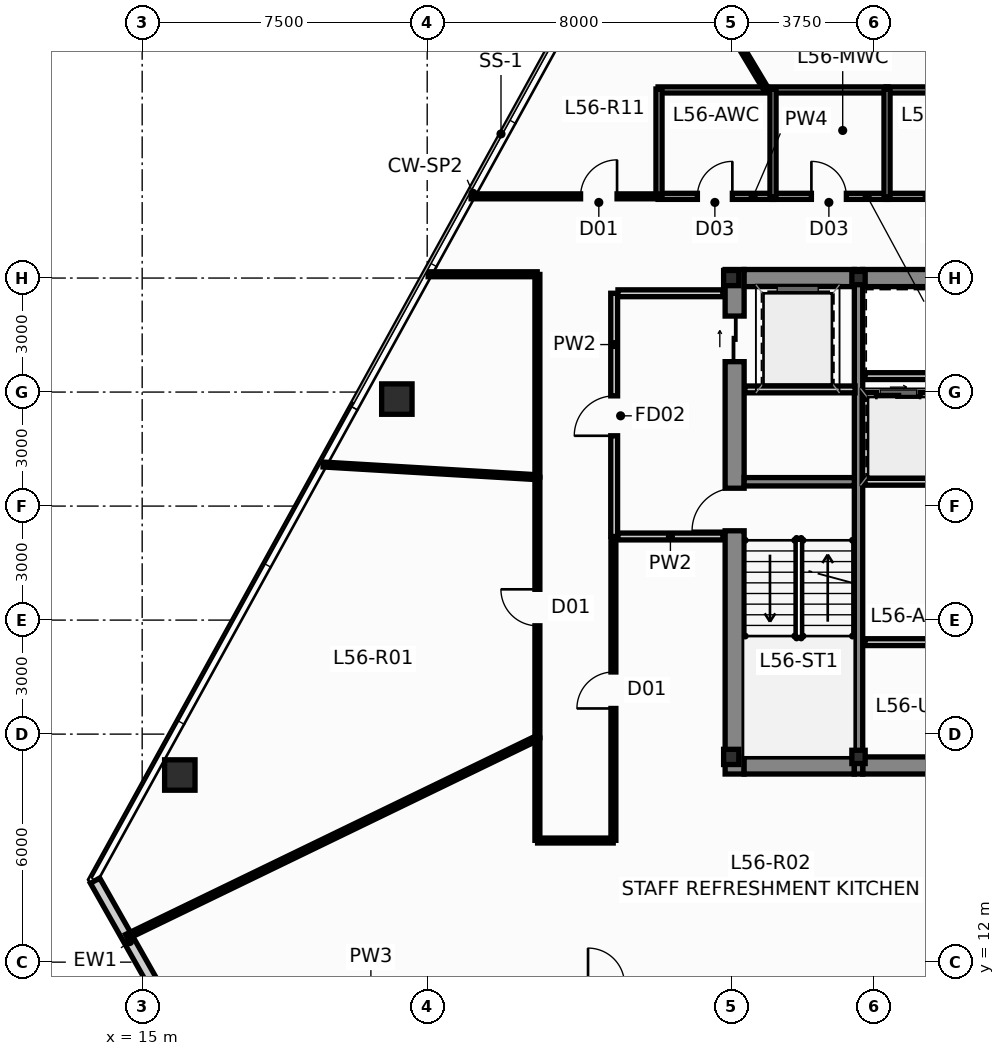
"""IFC4 building model, lengths in metres.
Left out: names, types, materials, properties, quantities, classifications, styles, units other than length and angle.
Written with IfcOpenShell. Run it as: python <this file> out.ifc"""

import sys

from ifc_helpers import new_model, si_unit, direction, frame, frame_2d, origin, origin_2d, place, context, subcontext, project, spatial, rectangle, hollow_rectangle, i_section, extrude, source, transform, mapped, element, fill, save


model = new_model("IFC4")
c1 = context("Model", 3, precision=1e-05, world=origin(), true_north=direction((0.0, 1.0)))
c2 = subcontext(c1, "Body", "Model", "MODEL_VIEW")
j1 = project(units=[si_unit("LENGTHUNIT", "METRE"), si_unit("PLANEANGLEUNIT", "RADIAN")], contexts=[c1])
p1 = place(None, origin())
s1 = spatial("IfcSite", under=j1, at=p1, CompositionType="ELEMENT")
p2 = place(p1, origin())
s2 = spatial("IfcBuilding", under=s1, at=p2, CompositionType="ELEMENT")
p3 = place(p2, frame((0.0, 0.0, 213.25)))
s3 = spatial("IfcBuildingStorey", under=s2, at=p3, CompositionType="ELEMENT", Elevation=213.25)
m1 = source(origin(), c2, "Body", "SweptSolid", [
    extrude(i_section(OverallWidth=0.4, OverallDepth=0.4, WebThickness=0.02, FlangeThickness=0.032, at=origin_2d()), origin(), (0.0, 0.0, 1.0), 3.65),
])
for number, where, z_axis, x_axis in (
    (1, (30.5, 17.4, 0.0), (0.0, 0.0, 1.0), (1.0, 0.0, 0.0)),
    (2, (30.5, 30.0, 0.0), (0.0, 0.0, 1.0), (1.0, 0.0, 0.0)),
):
    element("IfcColumn", number, at=place(p3, frame(where, z_axis=z_axis, x_axis=x_axis)), inside=s3, PredefinedType="COLUMN", context=c2, shape_type="MappedRepresentation", body=[
        mapped(m1, transform((0.0, 0.0, 0.0), scale=1.0)),
    ])
m2 = source(origin(), c2, "Body", "SweptSolid", [
    extrude(hollow_rectangle(XDim=0.35, YDim=0.35, WallThickness=0.016, at=origin_2d()), origin(), (0.0, 0.0, 1.0), 3.65),
])
for number, where, z_axis, x_axis in (
    (3, (33.85, 17.4, 0.0), (0.0, 0.0, 1.0), (1.0, 0.0, 0.0)),
    (4, (33.85, 30.0, 0.0), (0.0, 0.0, 1.0), (1.0, 0.0, 0.0)),
):
    element("IfcColumn", number, at=place(p3, frame(where, z_axis=z_axis, x_axis=x_axis)), inside=s3, PredefinedType="COLUMN", context=c2, shape_type="MappedRepresentation", body=[
        mapped(m2, transform((0.0, 0.0, 0.0), scale=1.0)),
    ])
p4 = place(p3, frame((30.59, 16.95, 0.0), z_axis=(0.0, 0.0, 1.0), x_axis=(0.0, 1.0, 0.0)))
e5 = element("IfcWall", 5, at=p4, inside=s3, PredefinedType="SHEAR", context=c2, shape_type="SweptSolid", body=[
    extrude(rectangle(XDim=13.275, YDim=0.5, at=frame_2d((6.638, 0.0))), origin(), (0.0, 0.0, 1.0), 3.65),
])
p5 = place(p4, frame((6.4, 0.0, 0.0)))
e6 = element("IfcOpeningElement", 6, at=p5, cuts=e5, PredefinedType="OPENING", context=c2, shape_type="SweptSolid", body=[
    extrude(rectangle(XDim=1.12, YDim=2.15, at=frame_2d((0.56, 1.075))), frame((0.0, 0.262, 0.0), z_axis=(0.0, -1.0, 0.0), x_axis=(1.0, 0.0, 0.0)), (0.0, 0.0, 1.0), 0.524),
])
p6 = place(p4, frame((10.85, 0.0, 0.0)))
e7 = element("IfcOpeningElement", 7, at=p6, cuts=e5, PredefinedType="OPENING", context=c2, shape_type="SweptSolid", body=[
    extrude(rectangle(XDim=1.2, YDim=2.2, at=frame_2d((0.6, 1.1))), frame((0.0, 0.262, 0.0), z_axis=(0.0, -1.0, 0.0), x_axis=(1.0, 0.0, 0.0)), (0.0, 0.0, 1.0), 0.524),
])
p7 = place(p3, frame((30.84, 17.175, 0.0), z_axis=(0.0, 0.0, 1.0), x_axis=(1.0, 0.0, 0.0)))
e8 = element("IfcWall", 8, at=p7, inside=s3, PredefinedType="SHEAR", context=c2, shape_type="SweptSolid", body=[
    extrude(rectangle(XDim=2.9, YDim=0.45, at=frame_2d((1.45, 0.0))), origin(), (0.0, 0.0, 1.0), 3.65),
])
p8 = place(p3, frame((33.96, 17.175, 0.0), z_axis=(0.0, 0.0, 1.0), x_axis=(1.0, 0.0, 0.0)))
e9 = element("IfcWall", 9, at=p8, inside=s3, PredefinedType="SHEAR", context=c2, shape_type="SweptSolid", body=[
    extrude(rectangle(XDim=8.08, YDim=0.45, at=frame_2d((4.04, 0.0))), origin(), (0.0, 0.0, 1.0), 3.65),
])
p9 = place(p3, frame((30.84, 30.0, 0.0), z_axis=(0.0, 0.0, 1.0), x_axis=(1.0, 0.0, 0.0)))
e10 = element("IfcWall", 10, at=p9, inside=s3, PredefinedType="SHEAR", context=c2, shape_type="SweptSolid", body=[
    extrude(rectangle(XDim=2.9, YDim=0.45, at=frame_2d((1.45, 0.0))), origin(), (0.0, 0.0, 1.0), 3.65),
])
p10 = place(p3, frame((33.96, 30.0, 0.0), z_axis=(0.0, 0.0, 1.0), x_axis=(1.0, 0.0, 0.0)))
e11 = element("IfcWall", 11, at=p10, inside=s3, PredefinedType="SHEAR", context=c2, shape_type="SweptSolid", body=[
    extrude(rectangle(XDim=3.78, YDim=0.45, at=frame_2d((1.89, 0.0))), origin(), (0.0, 0.0, 1.0), 3.65),
])
p11 = place(p3, frame((33.85, 16.95, 0.0), z_axis=(0.0, 0.0, 1.0), x_axis=(0.0, 1.0, 0.0)))
e12 = element("IfcWall", 12, at=p11, inside=s3, PredefinedType="SHEAR", context=c2, shape_type="SweptSolid", body=[
    extrude(rectangle(XDim=13.275, YDim=0.22, at=frame_2d((6.638, 0.0))), origin(), (0.0, 0.0, 1.0), 3.65),
])
p12 = place(p3, frame((30.84, 24.64, 0.0), z_axis=(0.0, 0.0, 1.0), x_axis=(1.0, 0.0, 0.0)))
e13 = element("IfcWall", 13, at=p12, inside=s3, PredefinedType="SHEAR", context=c2, shape_type="SweptSolid", body=[
    extrude(rectangle(XDim=2.9, YDim=0.22, at=frame_2d((1.45, 0.0))), origin(), (0.0, 0.0, 1.0), 3.65),
])
m3 = source(origin(), c2, "Body", "SweptSolid", [
    extrude(hollow_rectangle(XDim=0.8, YDim=0.8, WallThickness=0.045, at=origin_2d()), origin(), (0.0, 0.0, 1.0), 3.651),
])
p13 = place(p3, frame((21.701, 26.816, 0.0), z_axis=(0.014913313399, -0.013776424037, 0.999793880369), x_axis=(0.678553674548, 0.734550822447, 0.0)))
e14 = element("IfcColumn", 14, at=p13, inside=s3, PredefinedType="COLUMN", context=c2, shape_type="MappedRepresentation", body=[
    mapped(m3, transform((0.0, 0.0, 0.0), scale=1.0)),
])
m4 = source(origin(), c2, "Body", "SweptSolid", [
    extrude(hollow_rectangle(XDim=0.8, YDim=0.8, WallThickness=0.045, at=origin_2d()), origin(), (0.0, 0.0, 1.0), 3.651),
])
p14 = place(p3, frame((15.99, 16.924, 0.0), z_axis=(0.010431780378, -0.021599135014, 0.999712286273), x_axis=(0.900476348161, 0.434904985489, 0.0)))
e15 = element("IfcColumn", 15, at=p14, inside=s3, PredefinedType="COLUMN", context=c2, shape_type="MappedRepresentation", body=[
    mapped(m4, transform((0.0, 0.0, 0.0), scale=1.0)),
])
p15 = place(p3, frame((17.245, 7.995, 0.0), z_axis=(0.0, 0.0, 1.0), x_axis=(-0.492951566974, 0.870056752527, 0.0)))
e16 = element("IfcWall", 16, at=p15, inside=s3, PredefinedType="STANDARD", context=c2, shape_type="SweptSolid", body=[
    extrude(rectangle(XDim=7.068, YDim=0.28, at=frame_2d((3.534, 0.0))), origin(), (0.0, 0.0, 1.0), 3.4),
])
p16 = place(p15, frame((1.88, 0.0, 0.9)))
e17 = element("IfcOpeningElement", 17, at=p16, cuts=e16, PredefinedType="OPENING", context=c2, shape_type="SweptSolid", body=[
    extrude(rectangle(XDim=1.5, YDim=1.8, at=frame_2d((0.75, 0.9))), frame((0.0, 0.152, 0.0), z_axis=(0.0, -1.0, 0.0), x_axis=(1.0, 0.0, 0.0)), (0.0, 0.0, 1.0), 0.304),
])
p17 = place(p3, frame((34.02, 26.9, 0.0), z_axis=(0.0, 0.0, 1.0), x_axis=(1.0, 0.0, 0.0)))
e18 = element("IfcWall", 18, at=p17, inside=s3, PredefinedType="PARTITIONING", context=c2, shape_type="SweptSolid", body=[
    extrude(rectangle(XDim=3.6, YDim=0.18, at=frame_2d((1.8, 0.0))), origin(), (0.0, 0.0, 1.0), 3.4),
])
p18 = place(p17, frame((0.3, 0.0, 0.0)))
e19 = element("IfcOpeningElement", 19, at=p18, cuts=e18, PredefinedType="OPENING", context=c2, shape_type="SweptSolid", body=[
    extrude(rectangle(XDim=1.15, YDim=2.2, at=frame_2d((0.575, 1.1))), frame((0.0, 0.102, 0.0), z_axis=(0.0, -1.0, 0.0), x_axis=(1.0, 0.0, 0.0)), (0.0, 0.0, 1.0), 0.204),
])
p19 = place(p17, frame((2.1, 0.0, 0.0)))
e20 = element("IfcOpeningElement", 20, at=p19, cuts=e18, PredefinedType="OPENING", context=c2, shape_type="SweptSolid", body=[
    extrude(rectangle(XDim=1.15, YDim=2.2, at=frame_2d((0.575, 1.1))), frame((0.0, 0.102, 0.0), z_axis=(0.0, -1.0, 0.0), x_axis=(1.0, 0.0, 0.0)), (0.0, 0.0, 1.0), 0.204),
])
p20 = place(p3, frame((34.02, 24.64, 0.0), z_axis=(0.0, 0.0, 1.0), x_axis=(1.0, 0.0, 0.0)))
e21 = element("IfcWall", 21, at=p20, inside=s3, PredefinedType="PARTITIONING", context=c2, shape_type="SweptSolid", body=[
    extrude(rectangle(XDim=3.68, YDim=0.18, at=frame_2d((1.84, 0.0))), origin(), (0.0, 0.0, 1.0), 3.4),
])
p21 = place(p3, frame((34.02, 27.42, 0.0), z_axis=(0.0, 0.0, 1.0), x_axis=(1.0, 0.0, 0.0)))
e22 = element("IfcWall", 22, at=p21, inside=s3, PredefinedType="PARTITIONING", context=c2, shape_type="SweptSolid", body=[
    extrude(rectangle(XDim=3.66, YDim=0.18, at=frame_2d((1.83, 0.0))), origin(), (0.0, 0.0, 1.0), 3.4),
])
p22 = place(p3, frame((27.42, 23.2, 0.0), z_axis=(0.0, 0.0, 1.0), x_axis=(0.0, 1.0, 0.0)))
e23 = element("IfcWall", 23, at=p22, inside=s3, PredefinedType="PARTITIONING", context=c2, shape_type="SweptSolid", body=[
    extrude(rectangle(XDim=6.4, YDim=0.18, at=frame_2d((3.2, 0.0))), origin(), (0.0, 0.0, 1.0), 3.078),
])
p23 = place(p22, frame((2.65, 0.0, 0.0)))
e24 = element("IfcOpeningElement", 24, at=p23, cuts=e23, PredefinedType="OPENING", context=c2, shape_type="SweptSolid", body=[
    extrude(rectangle(XDim=1.05, YDim=2.15, at=frame_2d((0.525, 1.075))), frame((0.0, 0.102, 0.0), z_axis=(0.0, -1.0, 0.0), x_axis=(1.0, 0.0, 0.0)), (0.0, 0.0, 1.0), 0.204),
])
p24 = place(p3, frame((27.52, 23.2, 0.0), z_axis=(0.0, 0.0, 1.0), x_axis=(1.0, 0.0, 0.0)))
e25 = element("IfcWall", 25, at=p24, inside=s3, PredefinedType="PARTITIONING", context=c2, shape_type="SweptSolid", body=[
    extrude(rectangle(XDim=2.76, YDim=0.18, at=frame_2d((1.38, 0.0))), origin(), (0.0, 0.0, 1.0), 3.4),
])
p25 = place(p3, frame((27.52, 29.6, 0.0), z_axis=(0.0, 0.0, 1.0), x_axis=(1.0, 0.0, 0.0)))
e26 = element("IfcWall", 26, at=p25, inside=s3, PredefinedType="PARTITIONING", context=c2, shape_type="SweptSolid", body=[
    extrude(rectangle(XDim=2.76, YDim=0.18, at=frame_2d((1.38, 0.0))), origin(), (0.0, 0.0, 1.0), 2.925),
])
p26 = place(p3, frame((30.86, 27.07, 0.0), z_axis=(0.0, 0.0, 1.0), x_axis=(1.0, 0.0, 0.0)))
e27 = element("IfcWall", 27, at=p26, inside=s3, PredefinedType="PARTITIONING", context=c2, shape_type="SweptSolid", body=[
    extrude(rectangle(XDim=2.9, YDim=0.18, at=frame_2d((1.45, 0.0))), origin(), (0.0, 0.0, 1.0), 3.4),
])
p27 = place(p3, frame((34.02, 20.42, 0.0), z_axis=(0.0, 0.0, 1.0), x_axis=(1.0, 0.0, 0.0)))
e28 = element("IfcWall", 28, at=p27, inside=s3, PredefinedType="PARTITIONING", context=c2, shape_type="SweptSolid", body=[
    extrude(rectangle(XDim=3.64, YDim=0.18, at=frame_2d((1.82, 0.0))), origin(), (0.0, 0.0, 1.0), 3.4),
])
p28 = place(p3, frame((28.575, 32.15, 0.0), z_axis=(0.0, 0.0, 1.0), x_axis=(1.0, 0.0, 0.0)))
e29 = element("IfcWall", 29, at=p28, inside=s3, PredefinedType="PLUMBINGWALL", context=c2, shape_type="SweptSolid", body=[
    extrude(rectangle(XDim=3.05, YDim=0.16, at=frame_2d((1.525, 0.0))), origin(), (0.0, 0.0, 1.0), 3.4),
])
p29 = place(p28, frame((1.035, 0.0, 0.0)))
e30 = element("IfcOpeningElement", 30, at=p29, cuts=e29, PredefinedType="OPENING", context=c2, shape_type="SweptSolid", body=[
    extrude(rectangle(XDim=0.92, YDim=2.1, at=frame_2d((0.46, 1.05))), frame((0.0, 0.092, 0.0), z_axis=(0.0, -1.0, 0.0), x_axis=(1.0, 0.0, 0.0)), (0.0, 0.0, 1.0), 0.184),
])
p30 = place(p3, frame((31.575, 32.15, 0.0), z_axis=(0.0, 0.0, 1.0), x_axis=(1.0, 0.0, 0.0)))
e31 = element("IfcWall", 31, at=p30, inside=s3, PredefinedType="PLUMBINGWALL", context=c2, shape_type="SweptSolid", body=[
    extrude(rectangle(XDim=3.05, YDim=0.16, at=frame_2d((1.525, 0.0))), origin(), (0.0, 0.0, 1.0), 3.4),
])
p31 = place(p30, frame((1.035, 0.0, 0.0)))
e32 = element("IfcOpeningElement", 32, at=p31, cuts=e31, PredefinedType="OPENING", context=c2, shape_type="SweptSolid", body=[
    extrude(rectangle(XDim=0.92, YDim=2.1, at=frame_2d((0.46, 1.05))), frame((0.0, 0.092, 0.0), z_axis=(0.0, -1.0, 0.0), x_axis=(1.0, 0.0, 0.0)), (0.0, 0.0, 1.0), 0.184),
])
p32 = place(p3, frame((34.575, 32.15, 0.0), z_axis=(0.0, 0.0, 1.0), x_axis=(1.0, 0.0, 0.0)))
e33 = element("IfcWall", 33, at=p32, inside=s3, PredefinedType="PLUMBINGWALL", context=c2, shape_type="SweptSolid", body=[
    extrude(rectangle(XDim=3.05, YDim=0.16, at=frame_2d((1.525, 0.0))), origin(), (0.0, 0.0, 1.0), 3.4),
])
p33 = place(p32, frame((1.035, 0.0, 0.0)))
e34 = element("IfcOpeningElement", 34, at=p33, cuts=e33, PredefinedType="OPENING", context=c2, shape_type="SweptSolid", body=[
    extrude(rectangle(XDim=0.92, YDim=2.1, at=frame_2d((0.46, 1.05))), frame((0.0, 0.092, 0.0), z_axis=(0.0, -1.0, 0.0), x_axis=(1.0, 0.0, 0.0)), (0.0, 0.0, 1.0), 0.184),
])
for number, where, z_axis, x_axis in (
    (35, (31.575, 34.95, 0.0), (0.0, 0.0, 1.0), (1.0, 0.0, 0.0)),
    (36, (37.625, 34.95, 0.0), (0.0, 0.0, 1.0), (-1.0, 0.0, 0.0)),
):
    element("IfcWall", number, at=place(p3, frame(where, z_axis=z_axis, x_axis=x_axis)), inside=s3, PredefinedType="PLUMBINGWALL", context=c2, shape_type="SweptSolid", body=[
        extrude(rectangle(XDim=3.05, YDim=0.16, at=frame_2d((1.525, 0.0))), origin(), (0.0, 0.0, 1.0), 3.4),
    ])
p34 = place(p3, frame((28.575, 34.95, 0.0), z_axis=(0.0, 0.0, 1.0), x_axis=(1.0, 0.0, 0.0)))
e37 = element("IfcWall", 37, at=p34, inside=s3, PredefinedType="PLUMBINGWALL", context=c2, shape_type="SweptSolid", body=[
    extrude(rectangle(XDim=2.88, YDim=0.16, at=frame_2d((1.44, 0.0))), origin(), (0.0, 0.0, 1.0), 3.4),
])
p35 = place(p3, frame((31.6, 32.125, 0.0), z_axis=(0.0, 0.0, 1.0), x_axis=(0.0, 1.0, 0.0)))
e38 = element("IfcWall", 38, at=p35, inside=s3, PredefinedType="PLUMBINGWALL", context=c2, shape_type="SweptSolid", body=[
    extrude(rectangle(XDim=2.85, YDim=0.16, at=frame_2d((1.425, 0.0))), origin(), (0.0, 0.0, 1.0), 2.925),
])
for number, where, z_axis, x_axis in (
    (39, (28.6, 32.125, 0.0), (0.0, 0.0, 1.0), (0.0, 1.0, 0.0)),
    (40, (34.6, 32.125, 0.0), (0.0, 0.0, 1.0), (0.0, 1.0, 0.0)),
):
    element("IfcWall", number, at=place(p3, frame(where, z_axis=z_axis, x_axis=x_axis)), inside=s3, PredefinedType="PLUMBINGWALL", context=c2, shape_type="SweptSolid", body=[
        extrude(rectangle(XDim=2.85, YDim=0.16, at=frame_2d((1.425, 0.0))), origin(), (0.0, 0.0, 1.0), 3.4),
    ])
p36 = place(p3, frame((14.591, 12.669, 0.0), z_axis=(0.0, 0.0, 1.0), x_axis=(0.900125290786, 0.435631106428, 0.0)))
e41 = element("IfcWall", 41, at=p36, inside=s3, PredefinedType="PARTITIONING", context=c2, shape_type="SweptSolid", body=[
    extrude(rectangle(XDim=12.003, YDim=0.13, at=frame_2d((6.001, 0.0))), origin(), (0.0, 0.0, 1.0), 3.4),
])
p37 = place(p3, frame((27.4, 15.205, 0.0), z_axis=(0.0, 0.0, 1.0), x_axis=(0.0, 1.0, 0.0)))
e42 = element("IfcWall", 42, at=p37, inside=s3, PredefinedType="PARTITIONING", context=c2, shape_type="SweptSolid", body=[
    extrude(rectangle(XDim=7.9, YDim=0.13, at=frame_2d((3.95, 0.0))), origin(), (0.0, 0.0, 1.0), 3.4),
])
p38 = place(p37, frame((3.47, 0.0, 0.0)))
e43 = element("IfcOpeningElement", 43, at=p38, cuts=e42, PredefinedType="OPENING", context=c2, shape_type="SweptSolid", body=[
    extrude(rectangle(XDim=0.96, YDim=2.15, at=frame_2d((0.48, 1.075))), frame((0.0, 0.077, 0.0), z_axis=(0.0, -1.0, 0.0), x_axis=(1.0, 0.0, 0.0)), (0.0, 0.0, 1.0), 0.154),
])
p39 = place(p3, frame((25.4, 17.905, 0.0), z_axis=(0.0, 0.0, 1.0), x_axis=(0.0, 1.0, 0.0)))
e44 = element("IfcWall", 44, at=p39, inside=s3, PredefinedType="PARTITIONING", context=c2, shape_type="SweptSolid", body=[
    extrude(rectangle(XDim=6.85, YDim=0.13, at=frame_2d((3.425, 0.0))), origin(), (0.0, 0.0, 1.0), 3.078),
])
p40 = place(p39, frame((2.945, 0.0, 0.0)))
e45 = element("IfcOpeningElement", 45, at=p40, cuts=e44, PredefinedType="OPENING", context=c2, shape_type="SweptSolid", body=[
    extrude(rectangle(XDim=0.96, YDim=2.15, at=frame_2d((0.48, 1.075))), frame((0.0, 0.077, 0.0), z_axis=(0.0, -1.0, 0.0), x_axis=(1.0, 0.0, 0.0)), (0.0, 0.0, 1.0), 0.154),
])
p41 = place(p3, frame((28.187, 40.365, 0.0), z_axis=(0.0, 0.0, 1.0), x_axis=(0.513761212297, -0.85793322394, 0.0)))
e46 = element("IfcWall", 46, at=p41, inside=s3, PredefinedType="PARTITIONING", context=c2, shape_type="SweptSolid", body=[
    extrude(rectangle(XDim=6.307, YDim=0.13, at=frame_2d((3.153, 0.0))), origin(), (0.0, 0.0, 1.0), 3.4),
])
p42 = place(p3, frame((19.764, 25.094, 0.0), z_axis=(0.0, 0.0, 1.0), x_axis=(0.998248004668, -0.059168582681, 0.0)))
e47 = element("IfcWall", 47, at=p42, inside=s3, PredefinedType="PARTITIONING", context=c2, shape_type="SweptSolid", body=[
    extrude(rectangle(XDim=5.64, YDim=0.13, at=frame_2d((2.82, 0.0))), origin(), (0.0, 0.0, 1.0), 3.4),
])
p43 = place(p3, frame((25.4, 30.095, 0.0), z_axis=(0.0, 0.0, 1.0), x_axis=(0.0, -1.0, 0.0)))
e48 = element("IfcWall", 48, at=p43, inside=s3, PredefinedType="PARTITIONING", context=c2, shape_type="SweptSolid", body=[
    extrude(rectangle(XDim=5.33, YDim=0.13, at=frame_2d((2.665, 0.0))), origin(), (0.0, 0.0, 1.0), 3.078),
])
p44 = place(p3, frame((23.656, 32.15, 0.0), z_axis=(0.0, 0.0, 1.0), x_axis=(1.0, 0.0, 0.0)))
e49 = element("IfcWall", 49, at=p44, inside=s3, PredefinedType="PARTITIONING", context=c2, shape_type="SweptSolid", body=[
    extrude(rectangle(XDim=4.939, YDim=0.13, at=frame_2d((2.469, 0.0))), origin(), (0.0, 0.0, 1.0), 3.4),
])
p45 = place(p44, frame((2.88, 0.0, 0.0)))
e50 = element("IfcOpeningElement", 50, at=p45, cuts=e49, PredefinedType="OPENING", context=c2, shape_type="SweptSolid", body=[
    extrude(rectangle(XDim=0.96, YDim=2.15, at=frame_2d((0.48, 1.075))), frame((0.0, 0.077, 0.0), z_axis=(0.0, -1.0, 0.0), x_axis=(1.0, 0.0, 0.0)), (0.0, 0.0, 1.0), 0.154),
])
p46 = place(p3, frame((22.525, 30.1, 0.0), z_axis=(0.0, 0.0, 1.0), x_axis=(1.0, 0.0, 0.0)))
e51 = element("IfcWall", 51, at=p46, inside=s3, PredefinedType="PARTITIONING", context=c2, shape_type="SweptSolid", body=[
    extrude(rectangle(XDim=2.87, YDim=0.13, at=frame_2d((1.435, 0.0))), origin(), (0.0, 0.0, 1.0), 3.4),
])
p47 = place(p3, frame((25.4, 17.895, 0.0), z_axis=(0.0, 0.0, 1.0), x_axis=(0.0, -1.0, 0.0)))
e52 = element("IfcWall", 52, at=p47, inside=s3, PredefinedType="PARTITIONING", context=c2, shape_type="SweptSolid", body=[
    extrude(rectangle(XDim=2.69, YDim=0.13, at=frame_2d((1.345, 0.0))), origin(), (0.0, 0.0, 1.0), 3.078),
])
p48 = place(p3, frame((25.405, 15.2, 0.0), z_axis=(0.0, 0.0, 1.0), x_axis=(1.0, 0.0, 0.0)))
e53 = element("IfcWall", 53, at=p48, inside=s3, PredefinedType="PARTITIONING", context=c2, shape_type="SweptSolid", body=[
    extrude(rectangle(XDim=1.99, YDim=0.13, at=frame_2d((0.995, 0.0))), origin(), (0.0, 0.0, 1.0), 3.4),
])
p49 = place(p5, origin())
e54 = element("IfcDoor", 54, at=p49, inside=s3, OperationType="SINGLE_SWING_LEFT", PredefinedType="DOOR", context=c2, shape_type="SweptSolid", body=[
    extrude(rectangle(XDim=1.12, YDim=2.15, at=frame_2d((0.56, 1.075))), frame((0.0, 0.025, 0.0), z_axis=(0.0, -1.0, 0.0), x_axis=(1.0, 0.0, 0.0)), (0.0, 0.0, 1.0), 0.05),
])
fill(e6, e54)
p50 = place(p6, origin())
e55 = element("IfcDoor", 55, at=p50, inside=s3, OperationType="SLIDING_TO_LEFT", PredefinedType="DOOR", context=c2, shape_type="SweptSolid", body=[
    extrude(rectangle(XDim=1.2, YDim=2.2, at=frame_2d((0.6, 1.1))), frame((0.0, 0.025, 0.0), z_axis=(0.0, -1.0, 0.0), x_axis=(1.0, 0.0, 0.0)), (0.0, 0.0, 1.0), 0.05),
])
fill(e7, e55)
p51 = place(p18, origin())
e56 = element("IfcDoor", 56, at=p51, inside=s3, OperationType="SLIDING_TO_LEFT", PredefinedType="DOOR", context=c2, shape_type="SweptSolid", body=[
    extrude(rectangle(XDim=1.15, YDim=2.2, at=frame_2d((0.575, 1.1))), frame((0.0, 0.025, 0.0), z_axis=(0.0, -1.0, 0.0), x_axis=(1.0, 0.0, 0.0)), (0.0, 0.0, 1.0), 0.05),
])
fill(e19, e56)
p52 = place(p23, origin())
e57 = element("IfcDoor", 57, at=p52, inside=s3, OperationType="SINGLE_SWING_LEFT", PredefinedType="DOOR", context=c2, shape_type="SweptSolid", body=[
    extrude(rectangle(XDim=1.05, YDim=2.15, at=frame_2d((0.525, 1.075))), frame((0.0, 0.025, 0.0), z_axis=(0.0, -1.0, 0.0), x_axis=(1.0, 0.0, 0.0)), (0.0, 0.0, 1.0), 0.05),
])
fill(e24, e57)
p53 = place(p29, origin())
e58 = element("IfcDoor", 58, at=p53, inside=s3, OperationType="SINGLE_SWING_RIGHT", PredefinedType="DOOR", context=c2, shape_type="SweptSolid", body=[
    extrude(rectangle(XDim=0.92, YDim=2.1, at=frame_2d((0.46, 1.05))), frame((0.0, 0.025, 0.0), z_axis=(0.0, -1.0, 0.0), x_axis=(1.0, 0.0, 0.0)), (0.0, 0.0, 1.0), 0.05),
])
fill(e30, e58)
p54 = place(p31, origin())
e59 = element("IfcDoor", 59, at=p54, inside=s3, OperationType="SINGLE_SWING_LEFT", PredefinedType="DOOR", context=c2, shape_type="SweptSolid", body=[
    extrude(rectangle(XDim=0.92, YDim=2.1, at=frame_2d((0.46, 1.05))), frame((0.0, 0.025, 0.0), z_axis=(0.0, -1.0, 0.0), x_axis=(1.0, 0.0, 0.0)), (0.0, 0.0, 1.0), 0.05),
])
fill(e32, e59)
p55 = place(p38, origin())
e60 = element("IfcDoor", 60, at=p55, inside=s3, OperationType="SINGLE_SWING_LEFT", PredefinedType="DOOR", context=c2, shape_type="SweptSolid", body=[
    extrude(rectangle(XDim=0.96, YDim=2.15, at=frame_2d((0.48, 1.075))), frame((0.0, 0.025, 0.0), z_axis=(0.0, -1.0, 0.0), x_axis=(1.0, 0.0, 0.0)), (0.0, 0.0, 1.0), 0.05),
])
fill(e43, e60)
p56 = place(p40, origin())
e61 = element("IfcDoor", 61, at=p56, inside=s3, OperationType="SINGLE_SWING_RIGHT", PredefinedType="DOOR", context=c2, shape_type="SweptSolid", body=[
    extrude(rectangle(XDim=0.96, YDim=2.15, at=frame_2d((0.48, 1.075))), frame((0.0, 0.025, 0.0), z_axis=(0.0, -1.0, 0.0), x_axis=(1.0, 0.0, 0.0)), (0.0, 0.0, 1.0), 0.05),
])
fill(e45, e61)
p57 = place(p45, origin())
e62 = element("IfcDoor", 62, at=p57, inside=s3, OperationType="SINGLE_SWING_RIGHT", PredefinedType="DOOR", context=c2, shape_type="SweptSolid", body=[
    extrude(rectangle(XDim=0.96, YDim=2.15, at=frame_2d((0.48, 1.075))), frame((0.0, 0.025, 0.0), z_axis=(0.0, -1.0, 0.0), x_axis=(1.0, 0.0, 0.0)), (0.0, 0.0, 1.0), 0.05),
])
fill(e50, e62)
save(model, sys.argv[1])
